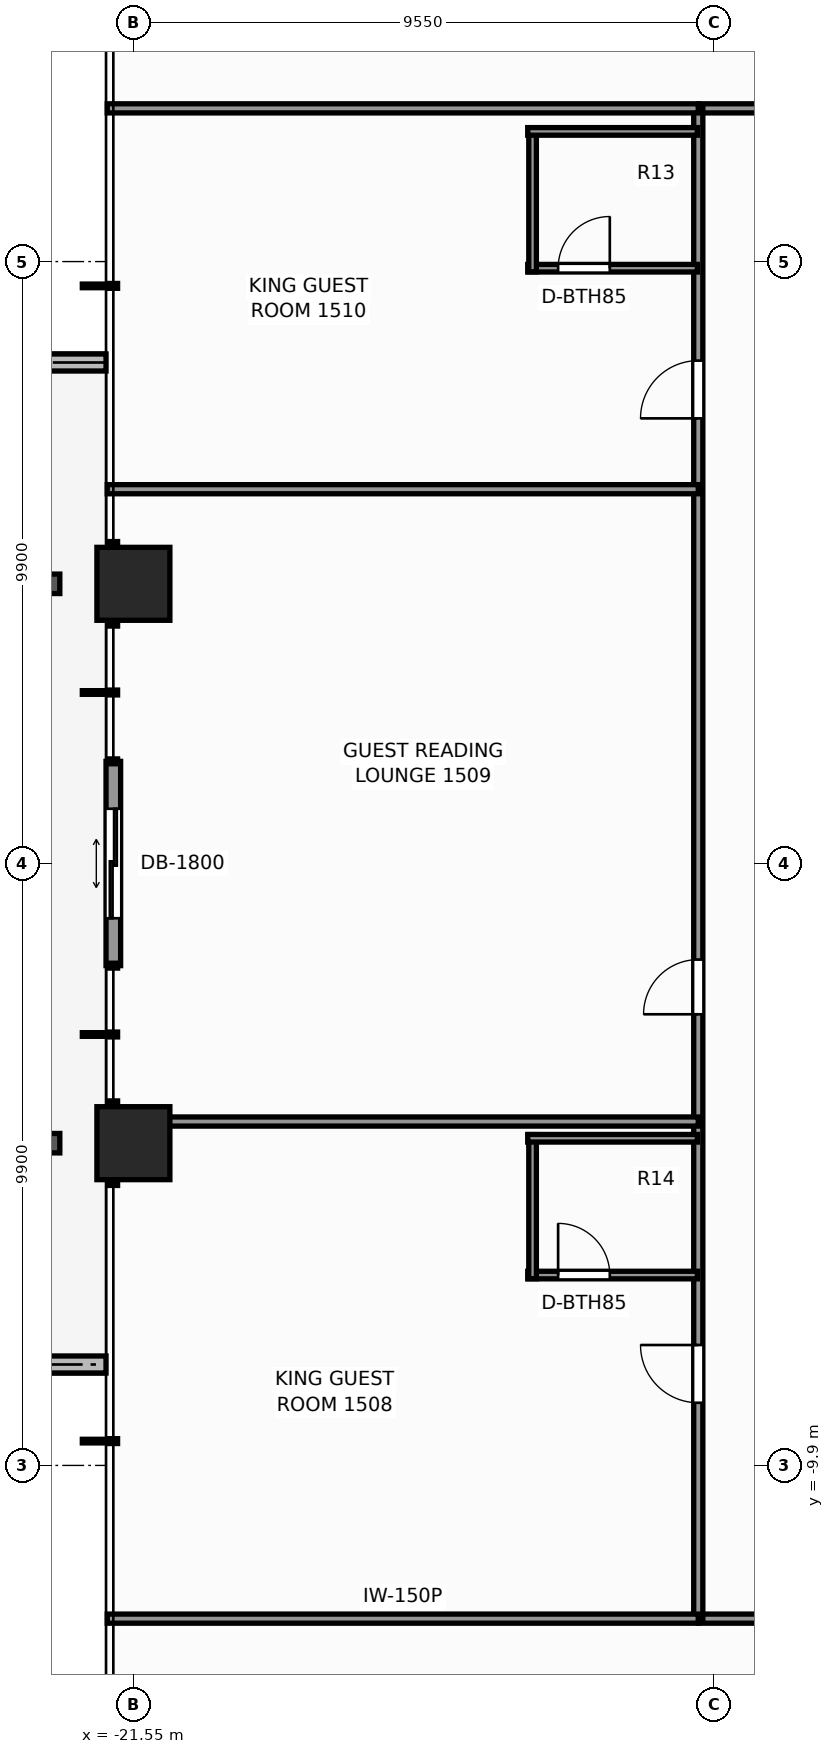
"""IFC4 building model, lengths in metres.
Left out: names, types, materials, properties, quantities, classifications, styles, units other than length and angle.
Written with IfcOpenShell. Run it as: python <this file> out.ifc"""

import sys

from ifc_helpers import new_model, si_unit, direction, frame, frame_2d, origin, origin_2d, place, context, subcontext, project, spatial, rectangle, extrude, element, fill, save


model = new_model("IFC4")
c1 = context("Model", 3, precision=1e-05, world=origin(), true_north=direction((0.0, 1.0)))
c2 = subcontext(c1, "Body", "Model", "MODEL_VIEW")
j1 = project(units=[si_unit("LENGTHUNIT", "METRE"), si_unit("PLANEANGLEUNIT", "RADIAN")], contexts=[c1])
p1 = place(None, origin())
s1 = spatial("IfcSite", under=j1, at=p1, CompositionType="ELEMENT")
p2 = place(p1, origin())
s2 = spatial("IfcBuilding", under=s1, at=p2, CompositionType="ELEMENT")
p3 = place(p2, frame((0.0, 0.0, 53.5)))
s3 = spatial("IfcBuildingStorey", under=s2, at=p3, CompositionType="ELEMENT", Elevation=53.5)
for number, where, z_axis, x_axis in (
    (1, (-21.55, -4.6, 0.0), (0.0, 0.0, 1.0), (1.0, 0.0, 0.0)),
    (2, (-21.55, 4.6, 0.0), (0.0, 0.0, 1.0), (1.0, 0.0, 0.0)),
):
    element("IfcColumn", number, at=place(p3, frame(where, z_axis=z_axis, x_axis=x_axis)), inside=s3, PredefinedType="COLUMN", context=c2, shape_type="SweptSolid", body=[
        extrude(rectangle(XDim=1.2, YDim=1.2, at=origin_2d()), origin(), (0.0, 0.0, 1.0), 3.3),
    ])
p4 = place(p3, frame((-23.26, -8.24, -0.06), z_axis=(0.0, 0.0, 1.0), x_axis=(1.0, 0.0, 0.0)))
e3 = element("IfcWall", 3, at=p4, inside=s3, PredefinedType="PARAPET", context=c2, shape_type="SweptSolid", body=[
    extrude(rectangle(XDim=1.26, YDim=0.28, at=frame_2d((0.63, 0.0))), origin(), (0.0, 0.0, 1.0), 0.42),
])
p5 = place(p3, frame((-22.0, 8.24, -0.06), z_axis=(0.0, 0.0, 1.0), x_axis=(-1.0, 0.0, 0.0)))
e4 = element("IfcWall", 4, at=p5, inside=s3, PredefinedType="PARAPET", context=c2, shape_type="SweptSolid", body=[
    extrude(rectangle(XDim=2.006, YDim=0.28, at=frame_2d((1.003, 0.0))), origin(), (0.0, 0.0, 1.0), 0.42),
])
p6 = place(p3, frame((-21.88, -1.68, 0.0), z_axis=(0.0, 0.0, 1.0), x_axis=(0.0, 1.0, 0.0)))
e5 = element("IfcWall", 5, at=p6, inside=s3, PredefinedType="STANDARD", context=c2, shape_type="SweptSolid", body=[
    extrude(rectangle(XDim=3.36, YDim=0.24, at=frame_2d((1.68, 0.0))), origin(), (0.0, 0.0, 1.0), 3.06),
])
p7 = place(p6, frame((0.78, 0.0, 0.0)))
e6 = element("IfcOpeningElement", 6, at=p7, cuts=e5, PredefinedType="OPENING", context=c2, shape_type="SweptSolid", body=[
    extrude(rectangle(XDim=1.8, YDim=2.2, at=frame_2d((0.9, 1.1))), frame((0.0, 0.13, 0.0), z_axis=(0.0, -1.0, 0.0), x_axis=(1.0, 0.0, 0.0)), (0.0, 0.0, 1.0), 0.26),
])
p8 = place(p3, frame((-12.26, -12.42, 0.0), z_axis=(0.0, 0.0, 1.0), x_axis=(1.0, 0.0, 0.0)))
e7 = element("IfcWall", 7, at=p8, inside=s3, PredefinedType="PARTITIONING", context=c2, shape_type="SweptSolid", body=[
    extrude(rectangle(XDim=24.84, YDim=0.15, at=frame_2d((12.42, 0.0))), origin(), (0.0, 0.0, 1.0), 2.272),
])
p9 = place(p8, frame((2.944, 0.0, 0.0)))
e8 = element("IfcOpeningElement", 8, at=p9, cuts=e7, PredefinedType="OPENING", context=c2, shape_type="SweptSolid", body=[
    extrude(rectangle(XDim=0.9, YDim=2.06, at=frame_2d((0.45, 1.03))), frame((0.0, 0.085, 0.0), z_axis=(0.0, -1.0, 0.0), x_axis=(1.0, 0.0, 0.0)), (0.0, 0.0, 1.0), 0.17),
])
p10 = place(p8, frame((5.279, 0.0, 0.0)))
e9 = element("IfcOpeningElement", 9, at=p10, cuts=e7, PredefinedType="OPENING", context=c2, shape_type="SweptSolid", body=[
    extrude(rectangle(XDim=0.9, YDim=2.06, at=frame_2d((0.45, 1.03))), frame((0.0, 0.085, 0.0), z_axis=(0.0, -1.0, 0.0), x_axis=(1.0, 0.0, 0.0)), (0.0, 0.0, 1.0), 0.17),
])
p11 = place(p8, frame((10.12, 0.0, 0.0)))
e10 = element("IfcOpeningElement", 10, at=p11, cuts=e7, PredefinedType="OPENING", context=c2, shape_type="SweptSolid", body=[
    extrude(rectangle(XDim=0.9, YDim=2.06, at=frame_2d((0.45, 1.03))), frame((0.0, 0.085, 0.0), z_axis=(0.0, -1.0, 0.0), x_axis=(1.0, 0.0, 0.0)), (0.0, 0.0, 1.0), 0.17),
])
p12 = place(p8, frame((13.228, 0.0, 0.0)))
e11 = element("IfcOpeningElement", 11, at=p12, cuts=e7, PredefinedType="OPENING", context=c2, shape_type="SweptSolid", body=[
    extrude(rectangle(XDim=0.95, YDim=2.06, at=frame_2d((0.475, 1.03))), frame((0.0, 0.085, 0.0), z_axis=(0.0, -1.0, 0.0), x_axis=(1.0, 0.0, 0.0)), (0.0, 0.0, 1.0), 0.17),
])
p13 = place(p8, frame((17.983, 0.0, 0.0)))
e12 = element("IfcOpeningElement", 12, at=p13, cuts=e7, PredefinedType="OPENING", context=c2, shape_type="SweptSolid", body=[
    extrude(rectangle(XDim=0.9, YDim=2.06, at=frame_2d((0.45, 1.03))), frame((0.0, 0.085, 0.0), z_axis=(0.0, -1.0, 0.0), x_axis=(1.0, 0.0, 0.0)), (0.0, 0.0, 1.0), 0.17),
])
p14 = place(p8, frame((20.318, 0.0, 0.0)))
e13 = element("IfcOpeningElement", 13, at=p14, cuts=e7, PredefinedType="OPENING", context=c2, shape_type="SweptSolid", body=[
    extrude(rectangle(XDim=0.9, YDim=2.06, at=frame_2d((0.45, 1.03))), frame((0.0, 0.085, 0.0), z_axis=(0.0, -1.0, 0.0), x_axis=(1.0, 0.0, 0.0)), (0.0, 0.0, 1.0), 0.17),
])
p15 = place(p3, frame((-12.26, 12.42, 0.0), z_axis=(0.0, 0.0, 1.0), x_axis=(1.0, 0.0, 0.0)))
e14 = element("IfcWall", 14, at=p15, inside=s3, PredefinedType="PARTITIONING", context=c2, shape_type="SweptSolid", body=[
    extrude(rectangle(XDim=24.84, YDim=0.15, at=frame_2d((12.42, 0.0))), origin(), (0.0, 0.0, 1.0), 2.272),
])
p16 = place(p15, frame((3.979, 0.0, 0.0)))
e15 = element("IfcOpeningElement", 15, at=p16, cuts=e14, PredefinedType="OPENING", context=c2, shape_type="SweptSolid", body=[
    extrude(rectangle(XDim=0.9, YDim=2.06, at=frame_2d((0.45, 1.03))), frame((0.0, 0.085, 0.0), z_axis=(0.0, -1.0, 0.0), x_axis=(1.0, 0.0, 0.0)), (0.0, 0.0, 1.0), 0.17),
])
p17 = place(p15, frame((9.78, 0.0, 0.0)))
e16 = element("IfcOpeningElement", 16, at=p17, cuts=e14, PredefinedType="OPENING", context=c2, shape_type="SweptSolid", body=[
    extrude(rectangle(XDim=0.9, YDim=2.06, at=frame_2d((0.45, 1.03))), frame((0.0, 0.085, 0.0), z_axis=(0.0, -1.0, 0.0), x_axis=(1.0, 0.0, 0.0)), (0.0, 0.0, 1.0), 0.17),
])
p18 = place(p15, frame((19.345, 0.0, 0.0)))
e17 = element("IfcOpeningElement", 17, at=p18, cuts=e14, PredefinedType="OPENING", context=c2, shape_type="SweptSolid", body=[
    extrude(rectangle(XDim=0.9, YDim=2.06, at=frame_2d((0.45, 1.03))), frame((0.0, 0.085, 0.0), z_axis=(0.0, -1.0, 0.0), x_axis=(1.0, 0.0, 0.0)), (0.0, 0.0, 1.0), 0.17),
])
p19 = place(p3, frame((-12.26, -12.42, 0.0), z_axis=(0.0, 0.0, 1.0), x_axis=(0.0, 1.0, 0.0)))
e18 = element("IfcWall", 18, at=p19, inside=s3, PredefinedType="PARTITIONING", context=c2, shape_type="SweptSolid", body=[
    extrude(rectangle(XDim=24.84, YDim=0.15, at=frame_2d((12.42, 0.0))), origin(), (0.0, 0.0, 1.0), 2.272),
])
p20 = place(p19, frame((3.551, 0.0, 0.0)))
e19 = element("IfcOpeningElement", 19, at=p20, cuts=e18, PredefinedType="OPENING", context=c2, shape_type="SweptSolid", body=[
    extrude(rectangle(XDim=0.95, YDim=2.06, at=frame_2d((0.475, 1.03))), frame((0.0, 0.085, 0.0), z_axis=(0.0, -1.0, 0.0), x_axis=(1.0, 0.0, 0.0)), (0.0, 0.0, 1.0), 0.17),
])
p21 = place(p19, frame((9.94, 0.0, 0.0)))
e20 = element("IfcOpeningElement", 20, at=p21, cuts=e18, PredefinedType="OPENING", context=c2, shape_type="SweptSolid", body=[
    extrude(rectangle(XDim=0.9, YDim=2.06, at=frame_2d((0.45, 1.03))), frame((0.0, 0.085, 0.0), z_axis=(0.0, -1.0, 0.0), x_axis=(1.0, 0.0, 0.0)), (0.0, 0.0, 1.0), 0.17),
])
p22 = place(p19, frame((19.741, 0.0, 0.0)))
e21 = element("IfcOpeningElement", 21, at=p22, cuts=e18, PredefinedType="OPENING", context=c2, shape_type="SweptSolid", body=[
    extrude(rectangle(XDim=0.95, YDim=2.06, at=frame_2d((0.475, 1.03))), frame((0.0, 0.085, 0.0), z_axis=(0.0, -1.0, 0.0), x_axis=(1.0, 0.0, 0.0)), (0.0, 0.0, 1.0), 0.17),
])
for number, where, z_axis, x_axis in (
    (22, (-21.98, -12.42, 0.0), (0.0, 0.0, 1.0), (1.0, 0.0, 0.0)),
    (23, (-21.98, 12.42, 0.0), (0.0, 0.0, 1.0), (1.0, 0.0, 0.0)),
):
    element("IfcWall", number, at=place(p3, frame(where, z_axis=z_axis, x_axis=x_axis)), inside=s3, PredefinedType="PARTITIONING", context=c2, shape_type="SweptSolid", body=[
        extrude(rectangle(XDim=9.72, YDim=0.15, at=frame_2d((4.86, 0.0))), origin(), (0.0, 0.0, 1.0), 2.272),
    ])
p23 = place(p3, frame((-21.98, -4.244, 0.0), z_axis=(0.0, 0.0, 1.0), x_axis=(1.0, 0.0, 0.0)))
e24 = element("IfcWall", 24, at=p23, inside=s3, PredefinedType="PARTITIONING", context=c2, shape_type="SweptSolid", body=[
    extrude(rectangle(XDim=9.72, YDim=0.15, at=frame_2d((4.86, 0.0))), origin(), (0.0, 0.0, 1.0), 2.429),
])
p24 = place(p3, frame((-15.065, -6.769, 0.0), z_axis=(0.0, 0.0, 1.0), x_axis=(1.0, 0.0, 0.0)))
e25 = element("IfcWall", 25, at=p24, inside=s3, PredefinedType="PARTITIONING", context=c2, shape_type="SweptSolid", body=[
    extrude(rectangle(XDim=2.79, YDim=0.125, at=frame_2d((1.395, 0.0))), origin(), (0.0, 0.0, 1.0), 3.06),
])
p25 = place(p24, frame((0.5, 0.0, 0.0)))
e26 = element("IfcOpeningElement", 26, at=p25, cuts=e25, PredefinedType="OPENING", context=c2, shape_type="SweptSolid", body=[
    extrude(rectangle(XDim=0.85, YDim=2.03, at=frame_2d((0.425, 1.015))), frame((0.0, 0.073, 0.0), z_axis=(0.0, -1.0, 0.0), x_axis=(1.0, 0.0, 0.0)), (0.0, 0.0, 1.0), 0.145),
])
p26 = place(p3, frame((-14.985, -6.829, 0.0), z_axis=(0.0, 0.0, 1.0), x_axis=(0.0, 1.0, 0.0)))
e27 = element("IfcWall", 27, at=p26, inside=s3, PredefinedType="PARTITIONING", context=c2, shape_type="SweptSolid", body=[
    extrude(rectangle(XDim=2.37, YDim=0.125, at=frame_2d((1.185, 0.0))), origin(), (0.0, 0.0, 1.0), 2.272),
])
p27 = place(p3, frame((-15.065, -4.519, 0.0), z_axis=(0.0, 0.0, 1.0), x_axis=(1.0, 0.0, 0.0)))
e28 = element("IfcWall", 28, at=p27, inside=s3, PredefinedType="PARTITIONING", context=c2, shape_type="SweptSolid", body=[
    extrude(rectangle(XDim=2.79, YDim=0.125, at=frame_2d((1.395, 0.0))), origin(), (0.0, 0.0, 1.0), 2.272),
])
p28 = place(p3, frame((-21.98, 6.156, 0.0), z_axis=(0.0, 0.0, 1.0), x_axis=(1.0, 0.0, 0.0)))
e29 = element("IfcWall", 29, at=p28, inside=s3, PredefinedType="PARTITIONING", context=c2, shape_type="SweptSolid", body=[
    extrude(rectangle(XDim=9.72, YDim=0.15, at=frame_2d((4.86, 0.0))), origin(), (0.0, 0.0, 1.0), 2.429),
])
p29 = place(p3, frame((-15.065, 9.791, 0.0), z_axis=(0.0, 0.0, 1.0), x_axis=(1.0, 0.0, 0.0)))
e30 = element("IfcWall", 30, at=p29, inside=s3, PredefinedType="PARTITIONING", context=c2, shape_type="SweptSolid", body=[
    extrude(rectangle(XDim=2.79, YDim=0.125, at=frame_2d((1.395, 0.0))), origin(), (0.0, 0.0, 1.0), 3.06),
])
p30 = place(p29, frame((0.5, 0.0, 0.0)))
e31 = element("IfcOpeningElement", 31, at=p30, cuts=e30, PredefinedType="OPENING", context=c2, shape_type="SweptSolid", body=[
    extrude(rectangle(XDim=0.85, YDim=2.03, at=frame_2d((0.425, 1.015))), frame((0.0, 0.073, 0.0), z_axis=(0.0, -1.0, 0.0), x_axis=(1.0, 0.0, 0.0)), (0.0, 0.0, 1.0), 0.145),
])
p31 = place(p3, frame((-14.985, 9.731, 0.0), z_axis=(0.0, 0.0, 1.0), x_axis=(0.0, 1.0, 0.0)))
e32 = element("IfcWall", 32, at=p31, inside=s3, PredefinedType="PARTITIONING", context=c2, shape_type="SweptSolid", body=[
    extrude(rectangle(XDim=2.37, YDim=0.125, at=frame_2d((1.185, 0.0))), origin(), (0.0, 0.0, 1.0), 2.272),
])
p32 = place(p3, frame((-15.065, 12.041, 0.0), z_axis=(0.0, 0.0, 1.0), x_axis=(1.0, 0.0, 0.0)))
e33 = element("IfcWall", 33, at=p32, inside=s3, PredefinedType="PARTITIONING", context=c2, shape_type="SweptSolid", body=[
    extrude(rectangle(XDim=2.79, YDim=0.125, at=frame_2d((1.395, 0.0))), origin(), (0.0, 0.0, 1.0), 2.272),
])
p33 = place(p7, origin())
e34 = element("IfcDoor", 34, at=p33, inside=s3, OperationType="DOUBLE_DOOR_SLIDING", PredefinedType="DOOR", context=c2, shape_type="SweptSolid", body=[
    extrude(rectangle(XDim=1.8, YDim=2.2, at=frame_2d((0.9, 1.1))), frame((0.0, 0.025, 0.0), z_axis=(0.0, -1.0, 0.0), x_axis=(1.0, 0.0, 0.0)), (0.0, 0.0, 1.0), 0.05),
])
fill(e6, e34)
p34 = place(p25, origin())
e35 = element("IfcDoor", 35, at=p34, inside=s3, OperationType="SINGLE_SWING_LEFT", PredefinedType="DOOR", context=c2, shape_type="SweptSolid", body=[
    extrude(rectangle(XDim=0.85, YDim=2.03, at=frame_2d((0.425, 1.015))), frame((0.0, 0.025, 0.0), z_axis=(0.0, -1.0, 0.0), x_axis=(1.0, 0.0, 0.0)), (0.0, 0.0, 1.0), 0.05),
])
fill(e26, e35)
p35 = place(p20, origin())
e36 = element("IfcDoor", 36, at=p35, inside=s3, OperationType="SINGLE_SWING_RIGHT", PredefinedType="DOOR", context=c2, shape_type="SweptSolid", body=[
    extrude(rectangle(XDim=0.95, YDim=2.06, at=frame_2d((0.475, 1.03))), frame((0.0, 0.025, 0.0), z_axis=(0.0, -1.0, 0.0), x_axis=(1.0, 0.0, 0.0)), (0.0, 0.0, 1.0), 0.05),
])
fill(e19, e36)
p36 = place(p21, origin())
e37 = element("IfcDoor", 37, at=p36, inside=s3, OperationType="SINGLE_SWING_LEFT", PredefinedType="DOOR", context=c2, shape_type="SweptSolid", body=[
    extrude(rectangle(XDim=0.9, YDim=2.06, at=frame_2d((0.45, 1.03))), frame((0.0, 0.025, 0.0), z_axis=(0.0, -1.0, 0.0), x_axis=(1.0, 0.0, 0.0)), (0.0, 0.0, 1.0), 0.05),
])
fill(e20, e37)
p37 = place(p30, origin())
e38 = element("IfcDoor", 38, at=p37, inside=s3, OperationType="SINGLE_SWING_RIGHT", PredefinedType="DOOR", context=c2, shape_type="SweptSolid", body=[
    extrude(rectangle(XDim=0.85, YDim=2.03, at=frame_2d((0.425, 1.015))), frame((0.0, 0.025, 0.0), z_axis=(0.0, -1.0, 0.0), x_axis=(1.0, 0.0, 0.0)), (0.0, 0.0, 1.0), 0.05),
])
fill(e31, e38)
p38 = place(p22, origin())
e39 = element("IfcDoor", 39, at=p38, inside=s3, OperationType="SINGLE_SWING_LEFT", PredefinedType="DOOR", context=c2, shape_type="SweptSolid", body=[
    extrude(rectangle(XDim=0.95, YDim=2.06, at=frame_2d((0.475, 1.03))), frame((0.0, 0.025, 0.0), z_axis=(0.0, -1.0, 0.0), x_axis=(1.0, 0.0, 0.0)), (0.0, 0.0, 1.0), 0.05),
])
fill(e21, e39)
save(model, sys.argv[1])
